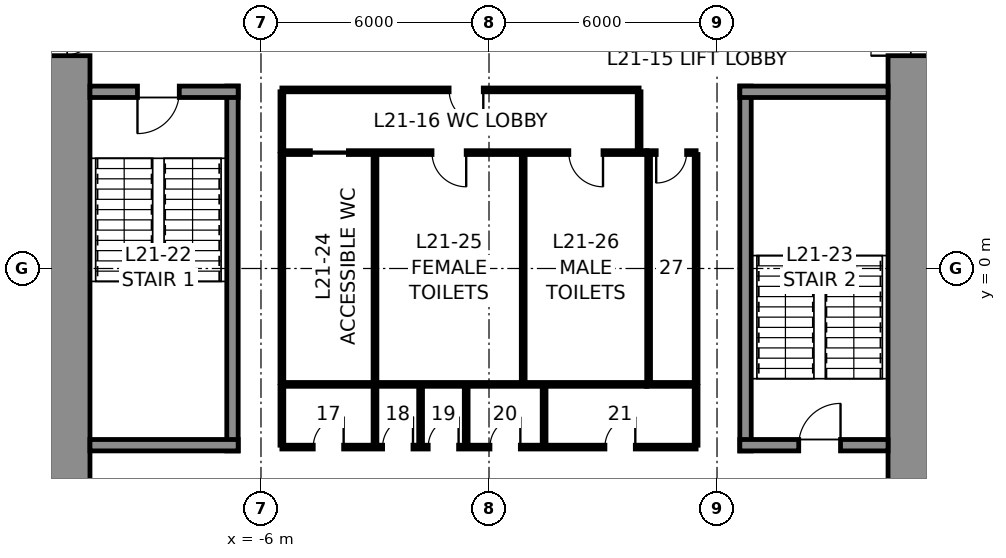
"""IFC4 building model, lengths in metres.
Left out: names, types, materials, properties, quantities, classifications, styles, units other than length and angle.
Written with IfcOpenShell. Run it as: python <this file> out.ifc"""

import sys

from ifc_helpers import new_model, si_unit, direction, frame, frame_2d, origin, place, context, subcontext, project, spatial, rectangle, extrude, element, fill, save


model = new_model("IFC4")
c1 = context("Model", 3, precision=1e-05, world=origin(), true_north=direction((0.0, 1.0)))
c2 = subcontext(c1, "Body", "Model", "MODEL_VIEW")
j1 = project(units=[si_unit("LENGTHUNIT", "METRE"), si_unit("PLANEANGLEUNIT", "RADIAN")], contexts=[c1])
p1 = place(None, origin())
s1 = spatial("IfcSite", under=j1, at=p1, CompositionType="ELEMENT")
p2 = place(p1, origin())
s2 = spatial("IfcBuilding", under=s1, at=p2, CompositionType="ELEMENT")
p3 = place(p2, frame((0.0, 0.0, 109.0)))
s3 = spatial("IfcBuildingStorey", under=s2, at=p3, CompositionType="ELEMENT", Elevation=109.0)
p4 = place(p3, frame((11.25, 10.5, 0.0), z_axis=(0.0, 0.0, 1.0), x_axis=(0.0, -1.0, 0.0)))
e1 = element("IfcWall", 1, at=p4, inside=s3, PredefinedType="SHEAR", context=c2, shape_type="SweptSolid", body=[
    extrude(rectangle(XDim=21.0, YDim=1.5, at=frame_2d((10.5, 0.0))), origin(), (0.0, 0.0, 1.0), 4.6),
])
p5 = place(p4, frame((3.7, 0.0, 0.0)))
e2 = element("IfcOpeningElement", 2, at=p5, cuts=e1, PredefinedType="OPENING", context=c2, shape_type="SweptSolid", body=[
    extrude(rectangle(XDim=1.2, YDim=2.3, at=frame_2d((0.6, 1.15))), frame((0.0, 0.76, 0.0), z_axis=(0.0, -1.0, 0.0), x_axis=(1.0, 0.0, 0.0)), (0.0, 0.0, 1.0), 1.52),
])
p6 = place(p4, frame((16.1, 0.0, 0.0)))
e3 = element("IfcOpeningElement", 3, at=p6, cuts=e1, PredefinedType="OPENING", context=c2, shape_type="SweptSolid", body=[
    extrude(rectangle(XDim=1.2, YDim=2.3, at=frame_2d((0.6, 1.15))), frame((0.0, 0.76, 0.0), z_axis=(0.0, -1.0, 0.0), x_axis=(1.0, 0.0, 0.0)), (0.0, 0.0, 1.0), 1.52),
])
p7 = place(p3, frame((-11.25, -10.5, 0.0), z_axis=(0.0, 0.0, 1.0), x_axis=(0.0, 1.0, 0.0)))
e4 = element("IfcWall", 4, at=p7, inside=s3, PredefinedType="SHEAR", context=c2, shape_type="SweptSolid", body=[
    extrude(rectangle(XDim=21.0, YDim=1.5, at=frame_2d((10.5, 0.0))), origin(), (0.0, 0.0, 1.0), 4.6),
])
p8 = place(p7, frame((16.1, 0.0, 0.0)))
e5 = element("IfcOpeningElement", 5, at=p8, cuts=e4, PredefinedType="OPENING", context=c2, shape_type="SweptSolid", body=[
    extrude(rectangle(XDim=1.2, YDim=2.3, at=frame_2d((0.6, 1.15))), frame((0.0, 0.76, 0.0), z_axis=(0.0, -1.0, 0.0), x_axis=(1.0, 0.0, 0.0)), (0.0, 0.0, 1.0), 1.52),
])
p9 = place(p7, frame((3.7, 0.0, 0.0)))
e6 = element("IfcOpeningElement", 6, at=p9, cuts=e4, PredefinedType="OPENING", context=c2, shape_type="SweptSolid", body=[
    extrude(rectangle(XDim=1.2, YDim=2.3, at=frame_2d((0.6, 1.15))), frame((0.0, 0.76, 0.0), z_axis=(0.0, -1.0, 0.0), x_axis=(1.0, 0.0, 0.0)), (0.0, 0.0, 1.0), 1.52),
])
p10 = place(p3, frame((-6.75, -4.8, 0.0), z_axis=(0.0, 0.0, 1.0), x_axis=(0.0, 1.0, 0.0)))
e7 = element("IfcWall", 7, at=p10, inside=s3, PredefinedType="SOLIDWALL", context=c2, shape_type="SweptSolid", body=[
    extrude(rectangle(XDim=9.6, YDim=0.3, at=frame_2d((4.8, 0.0))), origin(), (0.0, 0.0, 1.0), 4.35),
])
p11 = place(p3, frame((-10.5, 4.65, 0.0), z_axis=(0.0, 0.0, 1.0), x_axis=(1.0, 0.0, 0.0)))
e8 = element("IfcWall", 8, at=p11, inside=s3, PredefinedType="SOLIDWALL", context=c2, shape_type="SweptSolid", body=[
    extrude(rectangle(XDim=3.9, YDim=0.3, at=frame_2d((1.95, 0.0))), origin(), (0.0, 0.0, 1.0), 4.35),
])
p12 = place(p11, frame((1.25, 0.0, 0.0)))
e9 = element("IfcOpeningElement", 9, at=p12, cuts=e8, PredefinedType="OPENING", context=c2, shape_type="SweptSolid", body=[
    extrude(rectangle(XDim=1.1, YDim=2.3, at=frame_2d((0.55, 1.15))), frame((0.0, 0.16, 0.0), z_axis=(0.0, -1.0, 0.0), x_axis=(1.0, 0.0, 0.0)), (0.0, 0.0, 1.0), 0.32),
])
p13 = place(p3, frame((-6.6, -4.65, 0.0), z_axis=(0.0, 0.0, 1.0), x_axis=(-1.0, 0.0, 0.0)))
e10 = element("IfcWall", 10, at=p13, inside=s3, PredefinedType="SOLIDWALL", context=c2, shape_type="SweptSolid", body=[
    extrude(rectangle(XDim=3.9, YDim=0.3, at=frame_2d((1.95, 0.0))), origin(), (0.0, 0.0, 1.0), 4.35),
])
p14 = place(p3, frame((6.75, -4.8, 0.0), z_axis=(0.0, 0.0, 1.0), x_axis=(0.0, 1.0, 0.0)))
e11 = element("IfcWall", 11, at=p14, inside=s3, PredefinedType="SOLIDWALL", context=c2, shape_type="SweptSolid", body=[
    extrude(rectangle(XDim=9.6, YDim=0.3, at=frame_2d((4.8, 0.0))), origin(), (0.0, 0.0, 1.0), 4.35),
])
p15 = place(p3, frame((6.6, 4.65, 0.0), z_axis=(0.0, 0.0, 1.0), x_axis=(1.0, 0.0, 0.0)))
e12 = element("IfcWall", 12, at=p15, inside=s3, PredefinedType="SOLIDWALL", context=c2, shape_type="SweptSolid", body=[
    extrude(rectangle(XDim=3.9, YDim=0.3, at=frame_2d((1.95, 0.0))), origin(), (0.0, 0.0, 1.0), 4.35),
])
p16 = place(p3, frame((10.5, -4.65, 0.0), z_axis=(0.0, 0.0, 1.0), x_axis=(-1.0, 0.0, 0.0)))
e13 = element("IfcWall", 13, at=p16, inside=s3, PredefinedType="SOLIDWALL", context=c2, shape_type="SweptSolid", body=[
    extrude(rectangle(XDim=3.9, YDim=0.3, at=frame_2d((1.95, 0.0))), origin(), (0.0, 0.0, 1.0), 4.35),
])
p17 = place(p16, frame((1.25, 0.0, 0.0)))
e14 = element("IfcOpeningElement", 14, at=p17, cuts=e13, PredefinedType="OPENING", context=c2, shape_type="SweptSolid", body=[
    extrude(rectangle(XDim=1.1, YDim=2.3, at=frame_2d((0.55, 1.15))), frame((0.0, 0.16, 0.0), z_axis=(0.0, -1.0, 0.0), x_axis=(1.0, 0.0, 0.0)), (0.0, 0.0, 1.0), 0.32),
])
p18 = place(p3, frame((-5.45, 3.05, 0.0), z_axis=(0.0, 0.0, 1.0), x_axis=(1.0, 0.0, 0.0)))
e15 = element("IfcWall", 15, at=p18, inside=s3, PredefinedType="PARTITIONING", context=c2, shape_type="SweptSolid", body=[
    extrude(rectangle(XDim=9.6, YDim=0.1, at=frame_2d((4.8, 0.0))), origin(), (0.0, 0.0, 1.0), 4.35),
])
p19 = place(p18, frame((0.75, 0.0, 0.0)))
e16 = element("IfcOpeningElement", 16, at=p19, cuts=e15, PredefinedType="OPENING", context=c2, shape_type="SweptSolid", body=[
    extrude(rectangle(XDim=1.0, YDim=2.3, at=frame_2d((0.5, 1.15))), frame((0.0, 0.06, 0.0), z_axis=(0.0, -1.0, 0.0), x_axis=(1.0, 0.0, 0.0)), (0.0, 0.0, 1.0), 0.12),
])
p20 = place(p18, frame((3.95, 0.0, 0.0)))
e17 = element("IfcOpeningElement", 17, at=p20, cuts=e15, PredefinedType="OPENING", context=c2, shape_type="SweptSolid", body=[
    extrude(rectangle(XDim=0.9, YDim=2.3, at=frame_2d((0.45, 1.15))), frame((0.0, 0.06, 0.0), z_axis=(0.0, -1.0, 0.0), x_axis=(1.0, 0.0, 0.0)), (0.0, 0.0, 1.0), 0.12),
])
p21 = place(p18, frame((7.55, 0.0, 0.0)))
e18 = element("IfcOpeningElement", 18, at=p21, cuts=e15, PredefinedType="OPENING", context=c2, shape_type="SweptSolid", body=[
    extrude(rectangle(XDim=0.9, YDim=2.3, at=frame_2d((0.45, 1.15))), frame((0.0, 0.06, 0.0), z_axis=(0.0, -1.0, 0.0), x_axis=(1.0, 0.0, 0.0)), (0.0, 0.0, 1.0), 0.12),
])
p22 = place(p3, frame((4.15, 3.05, 0.0), z_axis=(0.0, 0.0, 1.0), x_axis=(1.0, 0.0, 0.0)))
e19 = element("IfcWall", 19, at=p22, inside=s3, PredefinedType="PARTITIONING", context=c2, shape_type="SweptSolid", body=[
    extrude(rectangle(XDim=1.3, YDim=0.1, at=frame_2d((0.65, 0.0))), origin(), (0.0, 0.0, 1.0), 4.35),
])
p23 = place(p22, frame((0.25, 0.0, 0.0)))
e20 = element("IfcOpeningElement", 20, at=p23, cuts=e19, PredefinedType="OPENING", context=c2, shape_type="SweptSolid", body=[
    extrude(rectangle(XDim=0.8, YDim=2.3, at=frame_2d((0.4, 1.15))), frame((0.0, 0.06, 0.0), z_axis=(0.0, -1.0, 0.0), x_axis=(1.0, 0.0, 0.0)), (0.0, 0.0, 1.0), 0.12),
])
p24 = place(p3, frame((4.15, -3.05, 0.0), z_axis=(0.0, 0.0, 1.0), x_axis=(-1.0, 0.0, 0.0)))
e21 = element("IfcWall", 21, at=p24, inside=s3, PredefinedType="PARTITIONING", context=c2, shape_type="SweptSolid", body=[
    extrude(rectangle(XDim=9.6, YDim=0.1, at=frame_2d((4.8, 0.0))), origin(), (0.0, 0.0, 1.0), 4.35),
])
p25 = place(p3, frame((5.45, -3.05, 0.0), z_axis=(0.0, 0.0, 1.0), x_axis=(-1.0, 0.0, 0.0)))
e22 = element("IfcWall", 22, at=p25, inside=s3, PredefinedType="PARTITIONING", context=c2, shape_type="SweptSolid", body=[
    extrude(rectangle(XDim=1.3, YDim=0.1, at=frame_2d((0.65, 0.0))), origin(), (0.0, 0.0, 1.0), 4.35),
])
for number, where, z_axis, x_axis in (
    (23, (5.45, 3.0, 0.0), (0.0, 0.0, 1.0), (0.0, -1.0, 0.0)),
    (24, (-5.45, -3.0, 0.0), (0.0, 0.0, 1.0), (0.0, 1.0, 0.0)),
    (25, (-3.0, -3.0, 0.0), (0.0, 0.0, 1.0), (0.0, 1.0, 0.0)),
    (26, (0.9, -3.0, 0.0), (0.0, 0.0, 1.0), (0.0, 1.0, 0.0)),
    (27, (4.2, -3.0, 0.0), (0.0, 0.0, 1.0), (0.0, 1.0, 0.0)),
):
    element("IfcWall", number, at=place(p3, frame(where, z_axis=z_axis, x_axis=x_axis)), inside=s3, PredefinedType="PARTITIONING", context=c2, shape_type="SweptSolid", body=[
        extrude(rectangle(XDim=6.0, YDim=0.1, at=frame_2d((3.0, 0.0))), origin(), (0.0, 0.0, 1.0), 4.35),
    ])
p26 = place(p3, frame((-5.45, 4.7, 0.0), z_axis=(0.0, 0.0, 1.0), x_axis=(1.0, 0.0, 0.0)))
e28 = element("IfcWall", 28, at=p26, inside=s3, PredefinedType="PARTITIONING", context=c2, shape_type="SweptSolid", body=[
    extrude(rectangle(XDim=9.4, YDim=0.1, at=frame_2d((4.7, 0.0))), origin(), (0.0, 0.0, 1.0), 4.35),
])
p27 = place(p26, frame((4.4, 0.0, 0.0)))
e29 = element("IfcOpeningElement", 29, at=p27, cuts=e28, PredefinedType="OPENING", context=c2, shape_type="SweptSolid", body=[
    extrude(rectangle(XDim=0.9, YDim=2.3, at=frame_2d((0.45, 1.15))), frame((0.0, 0.06, 0.0), z_axis=(0.0, -1.0, 0.0), x_axis=(1.0, 0.0, 0.0)), (0.0, 0.0, 1.0), 0.12),
])
for number, where, z_axis, x_axis in (
    (30, (-5.45, 3.1, 0.0), (0.0, 0.0, 1.0), (0.0, 1.0, 0.0)),
    (31, (3.95, 3.1, 0.0), (0.0, 0.0, 1.0), (0.0, 1.0, 0.0)),
):
    element("IfcWall", number, at=place(p3, frame(where, z_axis=z_axis, x_axis=x_axis)), inside=s3, PredefinedType="PARTITIONING", context=c2, shape_type="SweptSolid", body=[
        extrude(rectangle(XDim=1.55, YDim=0.1, at=frame_2d((0.775, 0.0))), origin(), (0.0, 0.0, 1.0), 4.35),
    ])
p28 = place(p3, frame((5.45, -4.7, 0.0), z_axis=(0.0, 0.0, 1.0), x_axis=(-1.0, 0.0, 0.0)))
e32 = element("IfcWall", 32, at=p28, inside=s3, PredefinedType="PARTITIONING", context=c2, shape_type="SweptSolid", body=[
    extrude(rectangle(XDim=10.9, YDim=0.1, at=frame_2d((5.45, 0.0))), origin(), (0.0, 0.0, 1.0), 4.35),
])
p29 = place(p28, frame((9.275, 0.0, 0.0)))
e33 = element("IfcOpeningElement", 33, at=p29, cuts=e32, PredefinedType="OPENING", context=c2, shape_type="SweptSolid", body=[
    extrude(rectangle(XDim=0.8, YDim=2.3, at=frame_2d((0.4, 1.15))), frame((0.0, 0.06, 0.0), z_axis=(0.0, -1.0, 0.0), x_axis=(1.0, 0.0, 0.0)), (0.0, 0.0, 1.0), 0.12),
])
p30 = place(p28, frame((7.45, 0.0, 0.0)))
e34 = element("IfcOpeningElement", 34, at=p30, cuts=e32, PredefinedType="OPENING", context=c2, shape_type="SweptSolid", body=[
    extrude(rectangle(XDim=0.8, YDim=2.3, at=frame_2d((0.4, 1.15))), frame((0.0, 0.06, 0.0), z_axis=(0.0, -1.0, 0.0), x_axis=(1.0, 0.0, 0.0)), (0.0, 0.0, 1.0), 0.12),
])
p31 = place(p28, frame((6.25, 0.0, 0.0)))
e35 = element("IfcOpeningElement", 35, at=p31, cuts=e32, PredefinedType="OPENING", context=c2, shape_type="SweptSolid", body=[
    extrude(rectangle(XDim=0.8, YDim=2.3, at=frame_2d((0.4, 1.15))), frame((0.0, 0.06, 0.0), z_axis=(0.0, -1.0, 0.0), x_axis=(1.0, 0.0, 0.0)), (0.0, 0.0, 1.0), 0.12),
])
p32 = place(p28, frame((4.625, 0.0, 0.0)))
e36 = element("IfcOpeningElement", 36, at=p32, cuts=e32, PredefinedType="OPENING", context=c2, shape_type="SweptSolid", body=[
    extrude(rectangle(XDim=0.8, YDim=2.3, at=frame_2d((0.4, 1.15))), frame((0.0, 0.06, 0.0), z_axis=(0.0, -1.0, 0.0), x_axis=(1.0, 0.0, 0.0)), (0.0, 0.0, 1.0), 0.12),
])
p33 = place(p28, frame((1.6, 0.0, 0.0)))
e37 = element("IfcOpeningElement", 37, at=p33, cuts=e32, PredefinedType="OPENING", context=c2, shape_type="SweptSolid", body=[
    extrude(rectangle(XDim=0.8, YDim=2.3, at=frame_2d((0.4, 1.15))), frame((0.0, 0.06, 0.0), z_axis=(0.0, -1.0, 0.0), x_axis=(1.0, 0.0, 0.0)), (0.0, 0.0, 1.0), 0.12),
])
for number, where, z_axis, x_axis in (
    (38, (-5.45, -3.1, 0.0), (0.0, 0.0, 1.0), (0.0, -1.0, 0.0)),
    (39, (5.45, -3.1, 0.0), (0.0, 0.0, 1.0), (0.0, -1.0, 0.0)),
    (40, (-3.0, -3.1, 0.0), (0.0, 0.0, 1.0), (0.0, -1.0, 0.0)),
    (41, (-1.8, -3.1, 0.0), (0.0, 0.0, 1.0), (0.0, -1.0, 0.0)),
    (42, (-0.6, -3.1, 0.0), (0.0, 0.0, 1.0), (0.0, -1.0, 0.0)),
    (43, (1.45, -3.1, 0.0), (0.0, 0.0, 1.0), (0.0, -1.0, 0.0)),
):
    element("IfcWall", number, at=place(p3, frame(where, z_axis=z_axis, x_axis=x_axis)), inside=s3, PredefinedType="PARTITIONING", context=c2, shape_type="SweptSolid", body=[
        extrude(rectangle(XDim=1.55, YDim=0.1, at=frame_2d((0.775, 0.0))), origin(), (0.0, 0.0, 1.0), 4.35),
    ])
p34 = place(p12, frame((1.1, 0.0, 0.0), z_axis=(0.0, 0.0, 1.0), x_axis=(-1.0, 0.0, 0.0)))
e44 = element("IfcDoor", 44, at=p34, inside=s3, OperationType="SINGLE_SWING_RIGHT", PredefinedType="DOOR", context=c2, shape_type="SweptSolid", body=[
    extrude(rectangle(XDim=1.1, YDim=2.3, at=frame_2d((0.55, 1.15))), frame((0.0, 0.025, 0.0), z_axis=(0.0, -1.0, 0.0), x_axis=(1.0, 0.0, 0.0)), (0.0, 0.0, 1.0), 0.05),
])
fill(e9, e44)
p35 = place(p17, frame((1.1, 0.0, 0.0), z_axis=(0.0, 0.0, 1.0), x_axis=(-1.0, 0.0, 0.0)))
e45 = element("IfcDoor", 45, at=p35, inside=s3, OperationType="SINGLE_SWING_RIGHT", PredefinedType="DOOR", context=c2, shape_type="SweptSolid", body=[
    extrude(rectangle(XDim=1.1, YDim=2.3, at=frame_2d((0.55, 1.15))), frame((0.0, 0.025, 0.0), z_axis=(0.0, -1.0, 0.0), x_axis=(1.0, 0.0, 0.0)), (0.0, 0.0, 1.0), 0.05),
])
fill(e14, e45)
p36 = place(p19, frame((1.0, 0.0, 0.0), z_axis=(0.0, 0.0, 1.0), x_axis=(-1.0, 0.0, 0.0)))
e46 = element("IfcDoor", 46, at=p36, inside=s3, OperationType="SLIDING_TO_LEFT", PredefinedType="DOOR", context=c2, shape_type="SweptSolid", body=[
    extrude(rectangle(XDim=1.0, YDim=2.3, at=frame_2d((0.5, 1.15))), frame((0.0, 0.025, 0.0), z_axis=(0.0, -1.0, 0.0), x_axis=(1.0, 0.0, 0.0)), (0.0, 0.0, 1.0), 0.05),
])
fill(e16, e46)
p37 = place(p20, frame((0.9, 0.0, 0.0), z_axis=(0.0, 0.0, 1.0), x_axis=(-1.0, 0.0, 0.0)))
e47 = element("IfcDoor", 47, at=p37, inside=s3, OperationType="SINGLE_SWING_LEFT", PredefinedType="DOOR", context=c2, shape_type="SweptSolid", body=[
    extrude(rectangle(XDim=0.9, YDim=2.3, at=frame_2d((0.45, 1.15))), frame((0.0, 0.025, 0.0), z_axis=(0.0, -1.0, 0.0), x_axis=(1.0, 0.0, 0.0)), (0.0, 0.0, 1.0), 0.05),
])
fill(e17, e47)
p38 = place(p21, frame((0.9, 0.0, 0.0), z_axis=(0.0, 0.0, 1.0), x_axis=(-1.0, 0.0, 0.0)))
e48 = element("IfcDoor", 48, at=p38, inside=s3, OperationType="SINGLE_SWING_LEFT", PredefinedType="DOOR", context=c2, shape_type="SweptSolid", body=[
    extrude(rectangle(XDim=0.9, YDim=2.3, at=frame_2d((0.45, 1.15))), frame((0.0, 0.025, 0.0), z_axis=(0.0, -1.0, 0.0), x_axis=(1.0, 0.0, 0.0)), (0.0, 0.0, 1.0), 0.05),
])
fill(e18, e48)
p39 = place(p23, frame((0.8, 0.0, 0.0), z_axis=(0.0, 0.0, 1.0), x_axis=(-1.0, 0.0, 0.0)))
e49 = element("IfcDoor", 49, at=p39, inside=s3, OperationType="SINGLE_SWING_RIGHT", PredefinedType="DOOR", context=c2, shape_type="SweptSolid", body=[
    extrude(rectangle(XDim=0.8, YDim=2.3, at=frame_2d((0.4, 1.15))), frame((0.0, 0.025, 0.0), z_axis=(0.0, -1.0, 0.0), x_axis=(1.0, 0.0, 0.0)), (0.0, 0.0, 1.0), 0.05),
])
fill(e20, e49)
p40 = place(p27, frame((0.9, 0.0, 0.0), z_axis=(0.0, 0.0, 1.0), x_axis=(-1.0, 0.0, 0.0)))
e50 = element("IfcDoor", 50, at=p40, inside=s3, OperationType="SINGLE_SWING_LEFT", PredefinedType="DOOR", context=c2, shape_type="SweptSolid", body=[
    extrude(rectangle(XDim=0.9, YDim=2.3, at=frame_2d((0.45, 1.15))), frame((0.0, 0.025, 0.0), z_axis=(0.0, -1.0, 0.0), x_axis=(1.0, 0.0, 0.0)), (0.0, 0.0, 1.0), 0.05),
])
fill(e29, e50)
p41 = place(p29, frame((0.8, 0.0, 0.0), z_axis=(0.0, 0.0, 1.0), x_axis=(-1.0, 0.0, 0.0)))
e51 = element("IfcDoor", 51, at=p41, inside=s3, OperationType="SINGLE_SWING_RIGHT", PredefinedType="DOOR", context=c2, shape_type="SweptSolid", body=[
    extrude(rectangle(XDim=0.8, YDim=2.3, at=frame_2d((0.4, 1.15))), frame((0.0, 0.025, 0.0), z_axis=(0.0, -1.0, 0.0), x_axis=(1.0, 0.0, 0.0)), (0.0, 0.0, 1.0), 0.05),
])
fill(e33, e51)
p42 = place(p30, frame((0.8, 0.0, 0.0), z_axis=(0.0, 0.0, 1.0), x_axis=(-1.0, 0.0, 0.0)))
e52 = element("IfcDoor", 52, at=p42, inside=s3, OperationType="SINGLE_SWING_RIGHT", PredefinedType="DOOR", context=c2, shape_type="SweptSolid", body=[
    extrude(rectangle(XDim=0.8, YDim=2.3, at=frame_2d((0.4, 1.15))), frame((0.0, 0.025, 0.0), z_axis=(0.0, -1.0, 0.0), x_axis=(1.0, 0.0, 0.0)), (0.0, 0.0, 1.0), 0.05),
])
fill(e34, e52)
p43 = place(p31, frame((0.8, 0.0, 0.0), z_axis=(0.0, 0.0, 1.0), x_axis=(-1.0, 0.0, 0.0)))
e53 = element("IfcDoor", 53, at=p43, inside=s3, OperationType="SINGLE_SWING_RIGHT", PredefinedType="DOOR", context=c2, shape_type="SweptSolid", body=[
    extrude(rectangle(XDim=0.8, YDim=2.3, at=frame_2d((0.4, 1.15))), frame((0.0, 0.025, 0.0), z_axis=(0.0, -1.0, 0.0), x_axis=(1.0, 0.0, 0.0)), (0.0, 0.0, 1.0), 0.05),
])
fill(e35, e53)
p44 = place(p32, frame((0.8, 0.0, 0.0), z_axis=(0.0, 0.0, 1.0), x_axis=(-1.0, 0.0, 0.0)))
e54 = element("IfcDoor", 54, at=p44, inside=s3, OperationType="SINGLE_SWING_RIGHT", PredefinedType="DOOR", context=c2, shape_type="SweptSolid", body=[
    extrude(rectangle(XDim=0.8, YDim=2.3, at=frame_2d((0.4, 1.15))), frame((0.0, 0.025, 0.0), z_axis=(0.0, -1.0, 0.0), x_axis=(1.0, 0.0, 0.0)), (0.0, 0.0, 1.0), 0.05),
])
fill(e36, e54)
p45 = place(p33, frame((0.8, 0.0, 0.0), z_axis=(0.0, 0.0, 1.0), x_axis=(-1.0, 0.0, 0.0)))
e55 = element("IfcDoor", 55, at=p45, inside=s3, OperationType="SINGLE_SWING_RIGHT", PredefinedType="DOOR", context=c2, shape_type="SweptSolid", body=[
    extrude(rectangle(XDim=0.8, YDim=2.3, at=frame_2d((0.4, 1.15))), frame((0.0, 0.025, 0.0), z_axis=(0.0, -1.0, 0.0), x_axis=(1.0, 0.0, 0.0)), (0.0, 0.0, 1.0), 0.05),
])
fill(e37, e55)
p46 = place(p8, frame((1.2, 0.0, 0.0), z_axis=(0.0, 0.0, 1.0), x_axis=(-1.0, 0.0, 0.0)))
e56 = element("IfcDoor", 56, at=p46, inside=s3, OperationType="SINGLE_SWING_LEFT", PredefinedType="DOOR", context=c2, shape_type="SweptSolid", body=[
    extrude(rectangle(XDim=1.2, YDim=2.3, at=frame_2d((0.6, 1.15))), frame((0.0, 0.025, 0.0), z_axis=(0.0, -1.0, 0.0), x_axis=(1.0, 0.0, 0.0)), (0.0, 0.0, 1.0), 0.05),
])
fill(e5, e56)
p47 = place(p5, frame((1.2, 0.0, 0.0), z_axis=(0.0, 0.0, 1.0), x_axis=(-1.0, 0.0, 0.0)))
e57 = element("IfcDoor", 57, at=p47, inside=s3, OperationType="SINGLE_SWING_LEFT", PredefinedType="DOOR", context=c2, shape_type="SweptSolid", body=[
    extrude(rectangle(XDim=1.2, YDim=2.3, at=frame_2d((0.6, 1.15))), frame((0.0, 0.025, 0.0), z_axis=(0.0, -1.0, 0.0), x_axis=(1.0, 0.0, 0.0)), (0.0, 0.0, 1.0), 0.05),
])
fill(e2, e57)
save(model, sys.argv[1])
